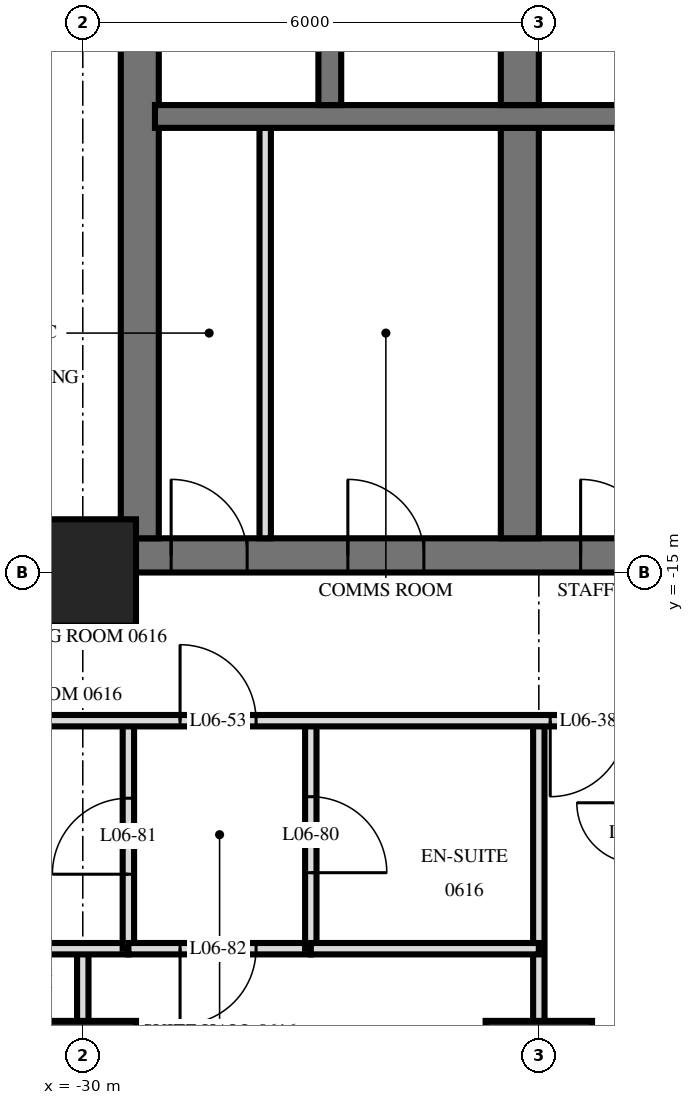
"""IFC4 building model, lengths in metres.
Left out: names, types, materials, properties, quantities, classifications, styles, units other than length and angle.
Written with IfcOpenShell. Run it as: python <this file> out.ifc"""

import sys

from ifc_helpers import new_model, si_unit, direction, frame, frame_2d, origin, origin_2d, place, context, subcontext, project, spatial, rectangle, extrude, element, fill, save


model = new_model("IFC4")
c1 = context("Model", 3, precision=1e-05, world=origin(), true_north=direction((0.0, 1.0)))
c2 = subcontext(c1, "Body", "Model", "MODEL_VIEW")
j1 = project(units=[si_unit("LENGTHUNIT", "METRE"), si_unit("PLANEANGLEUNIT", "RADIAN")], contexts=[c1])
p1 = place(None, origin())
s1 = spatial("IfcSite", under=j1, at=p1, CompositionType="ELEMENT")
p2 = place(p1, origin())
s2 = spatial("IfcBuilding", under=s1, at=p2, CompositionType="ELEMENT")
p3 = place(p2, frame((0.0, 0.0, 31.2)))
s3 = spatial("IfcBuildingStorey", under=s2, at=p3, CompositionType="ELEMENT", Elevation=31.2)
for number, where, z_axis, x_axis in (
    (1, (-30.0, -21.6, 0.0), (0.0, 0.0, 1.0), (1.0, 0.0, 0.0)),
    (2, (-30.0, -15.0, 0.0), (0.0, 0.0, 1.0), (1.0, 0.0, 0.0)),
    (3, (-24.0, -21.6, 0.0), (0.0, 0.0, 1.0), (1.0, 0.0, 0.0)),
):
    element("IfcColumn", number, at=place(p3, frame(where, z_axis=z_axis, x_axis=x_axis)), inside=s3, PredefinedType="COLUMN", context=c2, shape_type="SweptSolid", body=[
        extrude(rectangle(XDim=1.4, YDim=1.4, at=origin_2d()), origin(), (0.0, 0.0, 1.0), 3.6),
    ])
p4 = place(p3, frame((-29.5, -14.775, 0.0), z_axis=(0.0, 0.0, 1.0), x_axis=(1.0, 0.0, 0.0)))
e4 = element("IfcWall", 4, at=p4, inside=s3, PredefinedType="SHEAR", context=c2, shape_type="SweptSolid", body=[
    extrude(rectangle(XDim=19.5, YDim=0.45, at=frame_2d((9.75, 0.0))), origin(), (0.0, 0.0, 1.0), 3.6),
])
p5 = place(p4, frame((11.2, 0.0, 0.0)))
e5 = element("IfcOpeningElement", 5, at=p5, cuts=e4, PredefinedType="OPENING", context=c2, shape_type="SweptSolid", body=[
    extrude(rectangle(XDim=1.2, YDim=2.1, at=frame_2d((0.6, 1.05))), frame((0.0, 0.235, 0.0), z_axis=(0.0, -1.0, 0.0), x_axis=(1.0, 0.0, 0.0)), (0.0, 0.0, 1.0), 0.47),
])
p6 = place(p4, frame((14.25, 0.0, 0.0)))
e6 = element("IfcOpeningElement", 6, at=p6, cuts=e4, PredefinedType="OPENING", context=c2, shape_type="SweptSolid", body=[
    extrude(rectangle(XDim=1.1, YDim=2.1, at=frame_2d((0.55, 1.05))), frame((0.0, 0.235, 0.0), z_axis=(0.0, -1.0, 0.0), x_axis=(1.0, 0.0, 0.0)), (0.0, 0.0, 1.0), 0.47),
])
p7 = place(p4, frame((8.5, 0.0, 0.0)))
e7 = element("IfcOpeningElement", 7, at=p7, cuts=e4, PredefinedType="OPENING", context=c2, shape_type="SweptSolid", body=[
    extrude(rectangle(XDim=0.9, YDim=2.1, at=frame_2d((0.45, 1.05))), frame((0.0, 0.235, 0.0), z_axis=(0.0, -1.0, 0.0), x_axis=(1.0, 0.0, 0.0)), (0.0, 0.0, 1.0), 0.47),
])
p8 = place(p4, frame((6.05, 0.0, 0.0)))
e8 = element("IfcOpeningElement", 8, at=p8, cuts=e4, PredefinedType="OPENING", context=c2, shape_type="SweptSolid", body=[
    extrude(rectangle(XDim=1.0, YDim=2.1, at=frame_2d((0.5, 1.05))), frame((0.0, 0.235, 0.0), z_axis=(0.0, -1.0, 0.0), x_axis=(1.0, 0.0, 0.0)), (0.0, 0.0, 1.0), 0.47),
])
p9 = place(p4, frame((2.988, 0.0, 0.0)))
e9 = element("IfcOpeningElement", 9, at=p9, cuts=e4, PredefinedType="OPENING", context=c2, shape_type="SweptSolid", body=[
    extrude(rectangle(XDim=1.0, YDim=2.1, at=frame_2d((0.5, 1.05))), frame((0.0, 0.235, 0.0), z_axis=(0.0, -1.0, 0.0), x_axis=(1.0, 0.0, 0.0)), (0.0, 0.0, 1.0), 0.47),
])
p10 = place(p4, frame((0.663, 0.0, 0.0)))
e10 = element("IfcOpeningElement", 10, at=p10, cuts=e4, PredefinedType="OPENING", context=c2, shape_type="SweptSolid", body=[
    extrude(rectangle(XDim=1.0, YDim=2.1, at=frame_2d((0.5, 1.05))), frame((0.0, 0.235, 0.0), z_axis=(0.0, -1.0, 0.0), x_axis=(1.0, 0.0, 0.0)), (0.0, 0.0, 1.0), 0.47),
])
p11 = place(p3, frame((-29.25, -14.55, 0.0), z_axis=(0.0, 0.0, 1.0), x_axis=(0.0, 1.0, 0.0)))
e11 = element("IfcWall", 11, at=p11, inside=s3, PredefinedType="SHEAR", context=c2, shape_type="SweptSolid", body=[
    extrude(rectangle(XDim=14.1, YDim=0.5, at=frame_2d((7.05, 0.0))), origin(), (0.0, 0.0, 1.0), 3.6),
])
p12 = place(p3, frame((-29.05, -9.0, 0.0), z_axis=(0.0, 0.0, 1.0), x_axis=(1.0, 0.0, 0.0)))
e12 = element("IfcWall", 12, at=p12, inside=s3, PredefinedType="SHEAR", context=c2, shape_type="SweptSolid", body=[
    extrude(rectangle(XDim=18.7, YDim=0.3, at=frame_2d((9.35, 0.0))), origin(), (0.0, 0.0, 1.0), 3.6),
])
p13 = place(p12, frame((13.8, 0.0, 0.0)))
e13 = element("IfcOpeningElement", 13, at=p13, cuts=e12, PredefinedType="OPENING", context=c2, shape_type="SweptSolid", body=[
    extrude(rectangle(XDim=1.1, YDim=2.1, at=frame_2d((0.55, 1.05))), frame((0.0, 0.16, 0.0), z_axis=(0.0, -1.0, 0.0), x_axis=(1.0, 0.0, 0.0)), (0.0, 0.0, 1.0), 0.32),
])
p14 = place(p3, frame((-24.25, -8.85, 0.0), z_axis=(0.0, 0.0, 1.0), x_axis=(0.0, 1.0, 0.0)))
e14 = element("IfcWall", 14, at=p14, inside=s3, PredefinedType="SHEAR", context=c2, shape_type="SweptSolid", body=[
    extrude(rectangle(XDim=2.3, YDim=0.5, at=frame_2d((1.15, 0.0))), origin(), (0.0, 0.0, 1.0), 3.6),
])
p15 = place(p3, frame((-24.25, -14.55, 0.0), z_axis=(0.0, 0.0, 1.0), x_axis=(0.0, 1.0, 0.0)))
e15 = element("IfcWall", 15, at=p15, inside=s3, PredefinedType="SHEAR", context=c2, shape_type="SweptSolid", body=[
    extrude(rectangle(XDim=5.4, YDim=0.5, at=frame_2d((2.7, 0.0))), origin(), (0.0, 0.0, 1.0), 3.6),
])
p16 = place(p3, frame((-26.75, -8.85, 0.0), z_axis=(0.0, 0.0, 1.0), x_axis=(0.0, 1.0, 0.0)))
e16 = element("IfcWall", 16, at=p16, inside=s3, PredefinedType="SHEAR", context=c2, shape_type="SweptSolid", body=[
    extrude(rectangle(XDim=2.3, YDim=0.3, at=frame_2d((1.15, 0.0))), origin(), (0.0, 0.0, 1.0), 3.6),
])
p17 = place(p3, frame((-27.6, -14.55, 0.0), z_axis=(0.0, 0.0, 1.0), x_axis=(0.0, 1.0, 0.0)))
e17 = element("IfcWall", 17, at=p17, inside=s3, PredefinedType="PARTITIONING", context=c2, shape_type="SweptSolid", body=[
    extrude(rectangle(XDim=5.4, YDim=0.15, at=frame_2d((2.7, 0.0))), origin(), (0.0, 0.0, 1.0), 3.3),
])
p18 = place(p3, frame((-24.0, -29.22, 0.0), z_axis=(0.0, 0.0, 1.0), x_axis=(0.0, 1.0, 0.0)))
e18 = element("IfcWall", 18, at=p18, inside=s3, PredefinedType="PARTITIONING", context=c2, shape_type="SweptSolid", body=[
    extrude(rectangle(XDim=12.27, YDim=0.15, at=frame_2d((6.135, 0.0))), origin(), (0.0, 0.0, 1.0), 3.32),
])
p19 = place(p3, frame((-27.0, -19.95, 0.0), z_axis=(0.0, 0.0, 1.0), x_axis=(0.0, 1.0, 0.0)))
e19 = element("IfcWall", 19, at=p19, inside=s3, PredefinedType="PARTITIONING", context=c2, shape_type="SweptSolid", body=[
    extrude(rectangle(XDim=3.0, YDim=0.15, at=frame_2d((1.5, 0.0))), origin(), (0.0, 0.0, 1.0), 3.32),
])
p20 = place(p19, frame((1.0, 0.0, 0.0)))
e20 = element("IfcOpeningElement", 20, at=p20, cuts=e19, PredefinedType="OPENING", context=c2, shape_type="SweptSolid", body=[
    extrude(rectangle(XDim=1.0, YDim=2.1, at=frame_2d((0.5, 1.05))), frame((0.0, 0.085, 0.0), z_axis=(0.0, -1.0, 0.0), x_axis=(1.0, 0.0, 0.0)), (0.0, 0.0, 1.0), 0.17),
])
p21 = place(p3, frame((-29.4, -19.95, 0.0), z_axis=(0.0, 0.0, 1.0), x_axis=(0.0, 1.0, 0.0)))
e21 = element("IfcWall", 21, at=p21, inside=s3, PredefinedType="PARTITIONING", context=c2, shape_type="SweptSolid", body=[
    extrude(rectangle(XDim=3.0, YDim=0.15, at=frame_2d((1.5, 0.0))), origin(), (0.0, 0.0, 1.0), 3.32),
])
p22 = place(p21, frame((0.98, 0.0, 0.0)))
e22 = element("IfcOpeningElement", 22, at=p22, cuts=e21, PredefinedType="OPENING", context=c2, shape_type="SweptSolid", body=[
    extrude(rectangle(XDim=1.0, YDim=2.1, at=frame_2d((0.5, 1.05))), frame((0.0, 0.085, 0.0), z_axis=(0.0, -1.0, 0.0), x_axis=(1.0, 0.0, 0.0)), (0.0, 0.0, 1.0), 0.17),
])
p23 = place(p3, frame((-30.0, -28.978, 0.0), z_axis=(0.0, 0.0, 1.0), x_axis=(0.0, 1.0, 0.0)))
e23 = element("IfcWall", 23, at=p23, inside=s3, PredefinedType="PARTITIONING", context=c2, shape_type="SweptSolid", body=[
    extrude(rectangle(XDim=9.028, YDim=0.15, at=frame_2d((4.514, 0.0))), origin(), (0.0, 0.0, 1.0), 3.32),
])
p24 = place(p23, frame((3.987, 0.0, 0.0)))
e24 = element("IfcOpeningElement", 24, at=p24, cuts=e23, PredefinedType="OPENING", context=c2, shape_type="SweptSolid", body=[
    extrude(rectangle(XDim=0.9, YDim=2.1, at=frame_2d((0.45, 1.05))), frame((0.0, 0.085, 0.0), z_axis=(0.0, -1.0, 0.0), x_axis=(1.0, 0.0, 0.0)), (0.0, 0.0, 1.0), 0.17),
])
p25 = place(p3, frame((-29.4, -19.95, 0.0), z_axis=(0.0, 0.0, 1.0), x_axis=(1.0, 0.0, 0.0)))
e25 = element("IfcWall", 25, at=p25, inside=s3, PredefinedType="PARTITIONING", context=c2, shape_type="SweptSolid", body=[
    extrude(rectangle(XDim=2.4, YDim=0.15, at=frame_2d((1.2, 0.0))), origin(), (0.0, 0.0, 1.0), 3.32),
])
p26 = place(p25, frame((0.68, 0.0, 0.0)))
e26 = element("IfcOpeningElement", 26, at=p26, cuts=e25, PredefinedType="OPENING", context=c2, shape_type="SweptSolid", body=[
    extrude(rectangle(XDim=1.0, YDim=2.1, at=frame_2d((0.5, 1.05))), frame((0.0, 0.085, 0.0), z_axis=(0.0, -1.0, 0.0), x_axis=(1.0, 0.0, 0.0)), (0.0, 0.0, 1.0), 0.17),
])
p27 = place(p3, frame((-31.8, -19.95, 0.0), z_axis=(0.0, 0.0, 1.0), x_axis=(1.0, 0.0, 0.0)))
e27 = element("IfcWall", 27, at=p27, inside=s3, PredefinedType="PARTITIONING", context=c2, shape_type="SweptSolid", body=[
    extrude(rectangle(XDim=2.4, YDim=0.15, at=frame_2d((1.2, 0.0))), origin(), (0.0, 0.0, 1.0), 3.32),
])
p28 = place(p3, frame((-27.0, -19.95, 0.0), z_axis=(0.0, 0.0, 1.0), x_axis=(1.0, 0.0, 0.0)))
e28 = element("IfcWall", 28, at=p28, inside=s3, PredefinedType="PARTITIONING", context=c2, shape_type="SweptSolid", body=[
    extrude(rectangle(XDim=3.0, YDim=0.15, at=frame_2d((1.5, 0.0))), origin(), (0.0, 0.0, 1.0), 3.32),
])
p29 = place(p3, frame((-33.12, -16.95, 0.0), z_axis=(0.0, 0.0, 1.0), x_axis=(1.0, 0.0, 0.0)))
e29 = element("IfcWall", 29, at=p29, inside=s3, PredefinedType="PARTITIONING", context=c2, shape_type="SweptSolid", body=[
    extrude(rectangle(XDim=66.24, YDim=0.15, at=frame_2d((33.12, 0.0))), origin(), (0.0, 0.0, 1.0), 3.32),
])
p30 = place(p29, frame((9.27, 0.0, 0.0)))
e30 = element("IfcOpeningElement", 30, at=p30, cuts=e29, PredefinedType="OPENING", context=c2, shape_type="SweptSolid", body=[
    extrude(rectangle(XDim=1.0, YDim=2.1, at=frame_2d((0.5, 1.05))), frame((0.0, 0.085, 0.0), z_axis=(0.0, -1.0, 0.0), x_axis=(1.0, 0.0, 0.0)), (0.0, 0.0, 1.0), 0.17),
])
p31 = place(p29, frame((13.97, 0.0, 0.0)))
e31 = element("IfcOpeningElement", 31, at=p31, cuts=e29, PredefinedType="OPENING", context=c2, shape_type="SweptSolid", body=[
    extrude(rectangle(XDim=1.0, YDim=2.1, at=frame_2d((0.5, 1.05))), frame((0.0, 0.085, 0.0), z_axis=(0.0, -1.0, 0.0), x_axis=(1.0, 0.0, 0.0)), (0.0, 0.0, 1.0), 0.17),
])
p32 = place(p29, frame((15.27, 0.0, 0.0)))
e32 = element("IfcOpeningElement", 32, at=p32, cuts=e29, PredefinedType="OPENING", context=c2, shape_type="SweptSolid", body=[
    extrude(rectangle(XDim=1.0, YDim=2.1, at=frame_2d((0.5, 1.05))), frame((0.0, 0.085, 0.0), z_axis=(0.0, -1.0, 0.0), x_axis=(1.0, 0.0, 0.0)), (0.0, 0.0, 1.0), 0.17),
])
p33 = place(p29, frame((19.97, 0.0, 0.0)))
e33 = element("IfcOpeningElement", 33, at=p33, cuts=e29, PredefinedType="OPENING", context=c2, shape_type="SweptSolid", body=[
    extrude(rectangle(XDim=1.0, YDim=2.1, at=frame_2d((0.5, 1.05))), frame((0.0, 0.085, 0.0), z_axis=(0.0, -1.0, 0.0), x_axis=(1.0, 0.0, 0.0)), (0.0, 0.0, 1.0), 0.17),
])
p34 = place(p29, frame((22.27, 0.0, 0.0)))
e34 = element("IfcOpeningElement", 34, at=p34, cuts=e29, PredefinedType="OPENING", context=c2, shape_type="SweptSolid", body=[
    extrude(rectangle(XDim=1.0, YDim=2.1, at=frame_2d((0.5, 1.05))), frame((0.0, 0.085, 0.0), z_axis=(0.0, -1.0, 0.0), x_axis=(1.0, 0.0, 0.0)), (0.0, 0.0, 1.0), 0.17),
])
p35 = place(p29, frame((28.97, 0.0, 0.0)))
e35 = element("IfcOpeningElement", 35, at=p35, cuts=e29, PredefinedType="OPENING", context=c2, shape_type="SweptSolid", body=[
    extrude(rectangle(XDim=1.0, YDim=2.1, at=frame_2d((0.5, 1.05))), frame((0.0, 0.085, 0.0), z_axis=(0.0, -1.0, 0.0), x_axis=(1.0, 0.0, 0.0)), (0.0, 0.0, 1.0), 0.17),
])
p36 = place(p29, frame((30.27, 0.0, 0.0)))
e36 = element("IfcOpeningElement", 36, at=p36, cuts=e29, PredefinedType="OPENING", context=c2, shape_type="SweptSolid", body=[
    extrude(rectangle(XDim=1.0, YDim=2.1, at=frame_2d((0.5, 1.05))), frame((0.0, 0.085, 0.0), z_axis=(0.0, -1.0, 0.0), x_axis=(1.0, 0.0, 0.0)), (0.0, 0.0, 1.0), 0.17),
])
p37 = place(p29, frame((34.97, 0.0, 0.0)))
e37 = element("IfcOpeningElement", 37, at=p37, cuts=e29, PredefinedType="OPENING", context=c2, shape_type="SweptSolid", body=[
    extrude(rectangle(XDim=1.0, YDim=2.1, at=frame_2d((0.5, 1.05))), frame((0.0, 0.085, 0.0), z_axis=(0.0, -1.0, 0.0), x_axis=(1.0, 0.0, 0.0)), (0.0, 0.0, 1.0), 0.17),
])
p38 = place(p29, frame((36.27, 0.0, 0.0)))
e38 = element("IfcOpeningElement", 38, at=p38, cuts=e29, PredefinedType="OPENING", context=c2, shape_type="SweptSolid", body=[
    extrude(rectangle(XDim=1.0, YDim=2.1, at=frame_2d((0.5, 1.05))), frame((0.0, 0.085, 0.0), z_axis=(0.0, -1.0, 0.0), x_axis=(1.0, 0.0, 0.0)), (0.0, 0.0, 1.0), 0.17),
])
p39 = place(p29, frame((40.97, 0.0, 0.0)))
e39 = element("IfcOpeningElement", 39, at=p39, cuts=e29, PredefinedType="OPENING", context=c2, shape_type="SweptSolid", body=[
    extrude(rectangle(XDim=1.0, YDim=2.1, at=frame_2d((0.5, 1.05))), frame((0.0, 0.085, 0.0), z_axis=(0.0, -1.0, 0.0), x_axis=(1.0, 0.0, 0.0)), (0.0, 0.0, 1.0), 0.17),
])
p40 = place(p29, frame((42.27, 0.0, 0.0)))
e40 = element("IfcOpeningElement", 40, at=p40, cuts=e29, PredefinedType="OPENING", context=c2, shape_type="SweptSolid", body=[
    extrude(rectangle(XDim=1.0, YDim=2.1, at=frame_2d((0.5, 1.05))), frame((0.0, 0.085, 0.0), z_axis=(0.0, -1.0, 0.0), x_axis=(1.0, 0.0, 0.0)), (0.0, 0.0, 1.0), 0.17),
])
p41 = place(p29, frame((46.97, 0.0, 0.0)))
e41 = element("IfcOpeningElement", 41, at=p41, cuts=e29, PredefinedType="OPENING", context=c2, shape_type="SweptSolid", body=[
    extrude(rectangle(XDim=1.0, YDim=2.1, at=frame_2d((0.5, 1.05))), frame((0.0, 0.085, 0.0), z_axis=(0.0, -1.0, 0.0), x_axis=(1.0, 0.0, 0.0)), (0.0, 0.0, 1.0), 0.17),
])
p42 = place(p29, frame((48.27, 0.0, 0.0)))
e42 = element("IfcOpeningElement", 42, at=p42, cuts=e29, PredefinedType="OPENING", context=c2, shape_type="SweptSolid", body=[
    extrude(rectangle(XDim=1.0, YDim=2.1, at=frame_2d((0.5, 1.05))), frame((0.0, 0.085, 0.0), z_axis=(0.0, -1.0, 0.0), x_axis=(1.0, 0.0, 0.0)), (0.0, 0.0, 1.0), 0.17),
])
p43 = place(p29, frame((52.97, 0.0, 0.0)))
e43 = element("IfcOpeningElement", 43, at=p43, cuts=e29, PredefinedType="OPENING", context=c2, shape_type="SweptSolid", body=[
    extrude(rectangle(XDim=1.0, YDim=2.1, at=frame_2d((0.5, 1.05))), frame((0.0, 0.085, 0.0), z_axis=(0.0, -1.0, 0.0), x_axis=(1.0, 0.0, 0.0)), (0.0, 0.0, 1.0), 0.17),
])
p44 = place(p29, frame((54.27, 0.0, 0.0)))
e44 = element("IfcOpeningElement", 44, at=p44, cuts=e29, PredefinedType="OPENING", context=c2, shape_type="SweptSolid", body=[
    extrude(rectangle(XDim=1.0, YDim=2.1, at=frame_2d((0.5, 1.05))), frame((0.0, 0.085, 0.0), z_axis=(0.0, -1.0, 0.0), x_axis=(1.0, 0.0, 0.0)), (0.0, 0.0, 1.0), 0.17),
])
p45 = place(p29, frame((4.4, 0.0, 0.0)))
e45 = element("IfcOpeningElement", 45, at=p45, cuts=e29, PredefinedType="OPENING", context=c2, shape_type="SweptSolid", body=[
    extrude(rectangle(XDim=1.0, YDim=2.1, at=frame_2d((0.5, 1.05))), frame((0.0, 0.085, 0.0), z_axis=(0.0, -1.0, 0.0), x_axis=(1.0, 0.0, 0.0)), (0.0, 0.0, 1.0), 0.17),
])
p46 = place(p29, frame((60.8, 0.0, 0.0)))
e46 = element("IfcOpeningElement", 46, at=p46, cuts=e29, PredefinedType="OPENING", context=c2, shape_type="SweptSolid", body=[
    extrude(rectangle(XDim=1.0, YDim=2.1, at=frame_2d((0.5, 1.05))), frame((0.0, 0.085, 0.0), z_axis=(0.0, -1.0, 0.0), x_axis=(1.0, 0.0, 0.0)), (0.0, 0.0, 1.0), 0.17),
])
p47 = place(p3, frame((-33.12, -15.0, 0.0), z_axis=(0.0, 0.0, 1.0), x_axis=(1.0, 0.0, 0.0)))
e47 = element("IfcWall", 47, at=p47, inside=s3, PredefinedType="PARTITIONING", context=c2, shape_type="SweptSolid", body=[
    extrude(rectangle(XDim=3.57, YDim=0.15, at=frame_2d((1.785, 0.0))), origin(), (0.0, 0.0, 1.0), 3.32),
])
p48 = place(p47, frame((1.58, 0.0, 0.0)))
e48 = element("IfcOpeningElement", 48, at=p48, cuts=e47, PredefinedType="OPENING", context=c2, shape_type="SweptSolid", body=[
    extrude(rectangle(XDim=0.8, YDim=2.1, at=frame_2d((0.4, 1.05))), frame((0.0, 0.085, 0.0), z_axis=(0.0, -1.0, 0.0), x_axis=(1.0, 0.0, 0.0)), (0.0, 0.0, 1.0), 0.17),
])
p49 = place(p8, origin())
e49 = element("IfcDoor", 49, at=p49, inside=s3, OperationType="SINGLE_SWING_RIGHT", PredefinedType="DOOR", context=c2, shape_type="SweptSolid", body=[
    extrude(rectangle(XDim=1.0, YDim=2.1, at=frame_2d((0.5, 1.05))), frame((0.0, 0.025, 0.0), z_axis=(0.0, -1.0, 0.0), x_axis=(1.0, 0.0, 0.0)), (0.0, 0.0, 1.0), 0.05),
])
fill(e8, e49)
p50 = place(p9, origin())
e50 = element("IfcDoor", 50, at=p50, inside=s3, OperationType="SINGLE_SWING_RIGHT", PredefinedType="DOOR", context=c2, shape_type="SweptSolid", body=[
    extrude(rectangle(XDim=1.0, YDim=2.1, at=frame_2d((0.5, 1.05))), frame((0.0, 0.025, 0.0), z_axis=(0.0, -1.0, 0.0), x_axis=(1.0, 0.0, 0.0)), (0.0, 0.0, 1.0), 0.05),
])
fill(e9, e50)
p51 = place(p10, origin())
e51 = element("IfcDoor", 51, at=p51, inside=s3, OperationType="SINGLE_SWING_RIGHT", PredefinedType="DOOR", context=c2, shape_type="SweptSolid", body=[
    extrude(rectangle(XDim=1.0, YDim=2.1, at=frame_2d((0.5, 1.05))), frame((0.0, 0.025, 0.0), z_axis=(0.0, -1.0, 0.0), x_axis=(1.0, 0.0, 0.0)), (0.0, 0.0, 1.0), 0.05),
])
fill(e10, e51)
p52 = place(p30, frame((0.5, 0.0, 0.0), z_axis=(0.0, 0.0, 1.0), x_axis=(-1.0, 0.0, 0.0)))
e52 = element("IfcDoor", 52, at=p52, inside=s3, OperationType="SINGLE_SWING_LEFT", PredefinedType="DOOR", context=c2, shape_type="SweptSolid", body=[
    extrude(rectangle(XDim=1.0, YDim=2.1, at=frame_2d((0.0, 1.05))), frame((0.0, -0.025, 0.0), z_axis=(0.0, 1.0, 0.0), x_axis=(-1.0, 0.0, 0.0)), (0.0, 0.0, 1.0), 0.05),
])
fill(e30, e52)
p53 = place(p45, origin())
e53 = element("IfcDoor", 53, at=p53, inside=s3, OperationType="SINGLE_SWING_RIGHT", PredefinedType="DOOR", context=c2, shape_type="SweptSolid", body=[
    extrude(rectangle(XDim=1.0, YDim=2.1, at=frame_2d((0.5, 1.05))), frame((0.0, 0.025, 0.0), z_axis=(0.0, -1.0, 0.0), x_axis=(1.0, 0.0, 0.0)), (0.0, 0.0, 1.0), 0.05),
])
fill(e45, e53)
p54 = place(p20, frame((0.5, 0.0, 0.0), z_axis=(0.0, 0.0, 1.0), x_axis=(-1.0, 0.0, 0.0)))
e54 = element("IfcDoor", 54, at=p54, inside=s3, OperationType="SINGLE_SWING_LEFT", PredefinedType="DOOR", context=c2, shape_type="SweptSolid", body=[
    extrude(rectangle(XDim=1.0, YDim=2.1, at=frame_2d((0.0, 1.05))), frame((0.0, -0.025, 0.0), z_axis=(0.0, 1.0, 0.0), x_axis=(-1.0, 0.0, 0.0)), (0.0, 0.0, 1.0), 0.05),
])
fill(e20, e54)
p55 = place(p22, origin())
e55 = element("IfcDoor", 55, at=p55, inside=s3, OperationType="SINGLE_SWING_RIGHT", PredefinedType="DOOR", context=c2, shape_type="SweptSolid", body=[
    extrude(rectangle(XDim=1.0, YDim=2.1, at=frame_2d((0.5, 1.05))), frame((0.0, 0.025, 0.0), z_axis=(0.0, -1.0, 0.0), x_axis=(1.0, 0.0, 0.0)), (0.0, 0.0, 1.0), 0.05),
])
fill(e22, e55)
p56 = place(p26, frame((0.5, 0.0, 0.0), z_axis=(0.0, 0.0, 1.0), x_axis=(-1.0, 0.0, 0.0)))
e56 = element("IfcDoor", 56, at=p56, inside=s3, OperationType="SINGLE_SWING_LEFT", PredefinedType="DOOR", context=c2, shape_type="SweptSolid", body=[
    extrude(rectangle(XDim=1.0, YDim=2.1, at=frame_2d((0.0, 1.05))), frame((0.0, -0.025, 0.0), z_axis=(0.0, 1.0, 0.0), x_axis=(-1.0, 0.0, 0.0)), (0.0, 0.0, 1.0), 0.05),
])
fill(e26, e56)
save(model, sys.argv[1])
